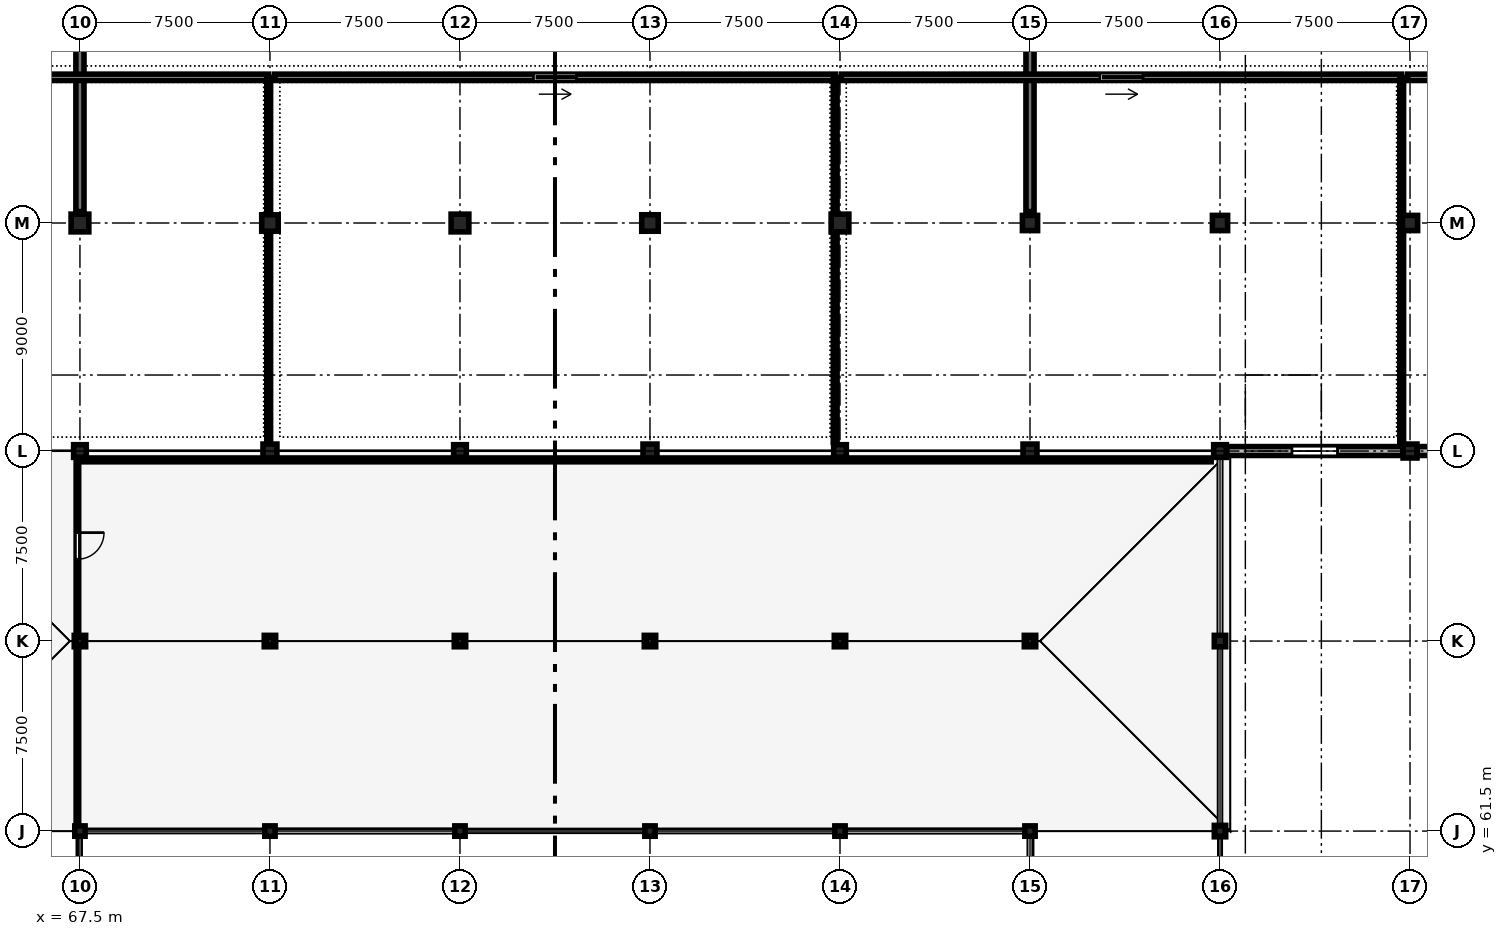
"""IFC4 building model, lengths in metres.
Left out: names, types, materials, properties, quantities, classifications, styles, units other than length and angle.
Written with IfcOpenShell. Run it as: python <this file> out.ifc"""

import sys

from ifc_helpers import new_model, si_unit, direction, frame, frame_2d, origin, origin_2d, place, context, subcontext, project, spatial, rectangle, circle, hollow_circle, i_section, extrude, element, fill, save


model = new_model("IFC4")
c1 = context("Model", 3, precision=1e-05, world=origin(), true_north=direction((0.0, 1.0)))
c2 = subcontext(c1, "Body", "Model", "MODEL_VIEW")
j1 = project(units=[si_unit("LENGTHUNIT", "METRE"), si_unit("PLANEANGLEUNIT", "RADIAN")], contexts=[c1])
p1 = place(None, origin())
s1 = spatial("IfcSite", under=j1, at=p1, CompositionType="ELEMENT")
p2 = place(p1, origin())
s2 = spatial("IfcBuilding", under=s1, at=p2, CompositionType="ELEMENT")
p3 = place(p2, frame((0.0, 0.0, 9.3)))
s3 = spatial("IfcBuildingStorey", under=s2, at=p3, CompositionType="ELEMENT", Elevation=9.3)
p4 = place(p3, frame((67.5, 61.5, 0.0), z_axis=(0.0, 0.0, 1.0), x_axis=(1.0, 0.0, 0.0)))
e1 = element("IfcColumn", 1, at=p4, inside=s3, PredefinedType="COLUMN", context=c2, shape_type="SweptSolid", body=[
    extrude(i_section(OverallWidth=0.3, OverallDepth=0.36, WebThickness=0.012, FlangeThickness=0.022, FilletRadius=0.027, at=origin_2d()), origin(), (0.0, 0.0, 1.0), 4.8),
])
p5 = place(p3, frame((67.5, 69.0, 0.0), z_axis=(0.0, 0.0, 1.0), x_axis=(1.0, 0.0, 0.0)))
e2 = element("IfcColumn", 2, at=p5, inside=s3, PredefinedType="COLUMN", context=c2, shape_type="SweptSolid", body=[
    extrude(rectangle(XDim=0.45, YDim=0.45, at=origin_2d()), origin(), (0.0, 0.0, 1.0), 4.8),
])
p6 = place(p3, frame((67.5, 76.5, 0.0), z_axis=(0.0, 0.0, 1.0), x_axis=(1.0, 0.0, 0.0)))
e3 = element("IfcColumn", 3, at=p6, inside=s3, PredefinedType="COLUMN", context=c2, shape_type="SweptSolid", body=[
    extrude(rectangle(XDim=0.5, YDim=0.5, at=origin_2d()), origin(), (0.0, 0.0, 1.0), 4.8),
])
p7 = place(p3, frame((67.5, 85.5, 0.0), z_axis=(0.0, 0.0, 1.0), x_axis=(1.0, 0.0, 0.0)))
e4 = element("IfcColumn", 4, at=p7, inside=s3, PredefinedType="COLUMN", context=c2, shape_type="SweptSolid", body=[
    extrude(rectangle(XDim=0.7, YDim=0.7, at=origin_2d()), origin(), (0.0, 0.0, 1.0), 4.8),
])
p8 = place(p3, frame((75.0, 61.5, 0.0), z_axis=(0.0, 0.0, 1.0), x_axis=(1.0, 0.0, 0.0)))
e5 = element("IfcColumn", 5, at=p8, inside=s3, PredefinedType="COLUMN", context=c2, shape_type="SweptSolid", body=[
    extrude(i_section(OverallWidth=0.3, OverallDepth=0.36, WebThickness=0.012, FlangeThickness=0.022, FilletRadius=0.027, at=origin_2d()), origin(), (0.0, 0.0, 1.0), 4.8),
])
p9 = place(p3, frame((75.0, 69.0, 0.0), z_axis=(0.0, 0.0, 1.0), x_axis=(1.0, 0.0, 0.0)))
e6 = element("IfcColumn", 6, at=p9, inside=s3, PredefinedType="COLUMN", context=c2, shape_type="SweptSolid", body=[
    extrude(rectangle(XDim=0.45, YDim=0.45, at=origin_2d()), origin(), (0.0, 0.0, 1.0), 4.8),
])
p10 = place(p3, frame((75.0, 76.5, 0.0), z_axis=(0.0, 0.0, 1.0), x_axis=(1.0, 0.0, 0.0)))
e7 = element("IfcColumn", 7, at=p10, inside=s3, PredefinedType="COLUMN", context=c2, shape_type="SweptSolid", body=[
    extrude(rectangle(XDim=0.55, YDim=0.55, at=origin_2d()), origin(), (0.0, 0.0, 1.0), 4.8),
])
p11 = place(p3, frame((75.0, 85.5, 0.0), z_axis=(0.0, 0.0, 1.0), x_axis=(1.0, 0.0, 0.0)))
e8 = element("IfcColumn", 8, at=p11, inside=s3, PredefinedType="COLUMN", context=c2, shape_type="SweptSolid", body=[
    extrude(rectangle(XDim=0.65, YDim=0.65, at=origin_2d()), origin(), (0.0, 0.0, 1.0), 4.8),
])
p12 = place(p3, frame((82.5, 61.5, 0.0), z_axis=(0.0, 0.0, 1.0), x_axis=(1.0, 0.0, 0.0)))
e9 = element("IfcColumn", 9, at=p12, inside=s3, PredefinedType="COLUMN", context=c2, shape_type="SweptSolid", body=[
    extrude(i_section(OverallWidth=0.3, OverallDepth=0.36, WebThickness=0.012, FlangeThickness=0.022, FilletRadius=0.027, at=origin_2d()), origin(), (0.0, 0.0, 1.0), 4.8),
])
p13 = place(p3, frame((82.5, 69.0, 0.0), z_axis=(0.0, 0.0, 1.0), x_axis=(1.0, 0.0, 0.0)))
e10 = element("IfcColumn", 10, at=p13, inside=s3, PredefinedType="COLUMN", context=c2, shape_type="SweptSolid", body=[
    extrude(rectangle(XDim=0.45, YDim=0.45, at=origin_2d()), origin(), (0.0, 0.0, 1.0), 4.8),
])
p14 = place(p3, frame((82.5, 76.5, 0.0), z_axis=(0.0, 0.0, 1.0), x_axis=(1.0, 0.0, 0.0)))
e11 = element("IfcColumn", 11, at=p14, inside=s3, PredefinedType="COLUMN", context=c2, shape_type="SweptSolid", body=[
    extrude(rectangle(XDim=0.5, YDim=0.5, at=origin_2d()), origin(), (0.0, 0.0, 1.0), 4.8),
])
p15 = place(p3, frame((82.5, 85.5, 0.0), z_axis=(0.0, 0.0, 1.0), x_axis=(1.0, 0.0, 0.0)))
e12 = element("IfcColumn", 12, at=p15, inside=s3, PredefinedType="COLUMN", context=c2, shape_type="SweptSolid", body=[
    extrude(rectangle(XDim=0.7, YDim=0.7, at=origin_2d()), origin(), (0.0, 0.0, 1.0), 4.8),
])
p16 = place(p3, frame((90.0, 61.5, 0.0), z_axis=(0.0, 0.0, 1.0), x_axis=(1.0, 0.0, 0.0)))
e13 = element("IfcColumn", 13, at=p16, inside=s3, PredefinedType="COLUMN", context=c2, shape_type="SweptSolid", body=[
    extrude(i_section(OverallWidth=0.3, OverallDepth=0.36, WebThickness=0.012, FlangeThickness=0.022, FilletRadius=0.027, at=origin_2d()), origin(), (0.0, 0.0, 1.0), 4.8),
])
p17 = place(p3, frame((90.0, 69.0, 0.0), z_axis=(0.0, 0.0, 1.0), x_axis=(1.0, 0.0, 0.0)))
e14 = element("IfcColumn", 14, at=p17, inside=s3, PredefinedType="COLUMN", context=c2, shape_type="SweptSolid", body=[
    extrude(rectangle(XDim=0.45, YDim=0.45, at=origin_2d()), origin(), (0.0, 0.0, 1.0), 4.8),
])
p18 = place(p3, frame((90.0, 76.5, 0.0), z_axis=(0.0, 0.0, 1.0), x_axis=(1.0, 0.0, 0.0)))
e15 = element("IfcColumn", 15, at=p18, inside=s3, PredefinedType="COLUMN", context=c2, shape_type="SweptSolid", body=[
    extrude(rectangle(XDim=0.55, YDim=0.55, at=origin_2d()), origin(), (0.0, 0.0, 1.0), 4.8),
])
p19 = place(p3, frame((90.0, 85.5, 0.0), z_axis=(0.0, 0.0, 1.0), x_axis=(1.0, 0.0, 0.0)))
e16 = element("IfcColumn", 16, at=p19, inside=s3, PredefinedType="COLUMN", context=c2, shape_type="SweptSolid", body=[
    extrude(rectangle(XDim=0.65, YDim=0.65, at=origin_2d()), origin(), (0.0, 0.0, 1.0), 4.8),
])
p20 = place(p3, frame((97.5, 61.5, 0.0), z_axis=(0.0, 0.0, 1.0), x_axis=(1.0, 0.0, 0.0)))
e17 = element("IfcColumn", 17, at=p20, inside=s3, PredefinedType="COLUMN", context=c2, shape_type="SweptSolid", body=[
    extrude(i_section(OverallWidth=0.3, OverallDepth=0.36, WebThickness=0.012, FlangeThickness=0.022, FilletRadius=0.027, at=origin_2d()), origin(), (0.0, 0.0, 1.0), 4.8),
])
p21 = place(p3, frame((97.5, 69.0, 0.0), z_axis=(0.0, 0.0, 1.0), x_axis=(1.0, 0.0, 0.0)))
e18 = element("IfcColumn", 18, at=p21, inside=s3, PredefinedType="COLUMN", context=c2, shape_type="SweptSolid", body=[
    extrude(rectangle(XDim=0.45, YDim=0.45, at=origin_2d()), origin(), (0.0, 0.0, 1.0), 4.8),
])
p22 = place(p3, frame((97.5, 76.5, 0.0), z_axis=(0.0, 0.0, 1.0), x_axis=(1.0, 0.0, 0.0)))
e19 = element("IfcColumn", 19, at=p22, inside=s3, PredefinedType="COLUMN", context=c2, shape_type="SweptSolid", body=[
    extrude(rectangle(XDim=0.5, YDim=0.5, at=origin_2d()), origin(), (0.0, 0.0, 1.0), 4.8),
])
p23 = place(p3, frame((97.5, 85.5, 0.0), z_axis=(0.0, 0.0, 1.0), x_axis=(1.0, 0.0, 0.0)))
e20 = element("IfcColumn", 20, at=p23, inside=s3, PredefinedType="COLUMN", context=c2, shape_type="SweptSolid", body=[
    extrude(rectangle(XDim=0.7, YDim=0.7, at=origin_2d()), origin(), (0.0, 0.0, 1.0), 4.8),
])
p24 = place(p3, frame((105.0, 61.5, 0.0), z_axis=(0.0, 0.0, 1.0), x_axis=(1.0, 0.0, 0.0)))
e21 = element("IfcColumn", 21, at=p24, inside=s3, PredefinedType="COLUMN", context=c2, shape_type="SweptSolid", body=[
    extrude(i_section(OverallWidth=0.3, OverallDepth=0.36, WebThickness=0.012, FlangeThickness=0.022, FilletRadius=0.027, at=origin_2d()), origin(), (0.0, 0.0, 1.0), 4.8),
])
p25 = place(p3, frame((105.0, 69.0, 0.0), z_axis=(0.0, 0.0, 1.0), x_axis=(1.0, 0.0, 0.0)))
e22 = element("IfcColumn", 22, at=p25, inside=s3, PredefinedType="COLUMN", context=c2, shape_type="SweptSolid", body=[
    extrude(rectangle(XDim=0.45, YDim=0.45, at=origin_2d()), origin(), (0.0, 0.0, 1.0), 4.8),
])
p26 = place(p3, frame((105.0, 76.5, 0.0), z_axis=(0.0, 0.0, 1.0), x_axis=(1.0, 0.0, 0.0)))
e23 = element("IfcColumn", 23, at=p26, inside=s3, PredefinedType="COLUMN", context=c2, shape_type="SweptSolid", body=[
    extrude(rectangle(XDim=0.55, YDim=0.55, at=origin_2d()), origin(), (0.0, 0.0, 1.0), 4.8),
])
p27 = place(p3, frame((105.0, 85.5, 0.0), z_axis=(0.0, 0.0, 1.0), x_axis=(1.0, 0.0, 0.0)))
e24 = element("IfcColumn", 24, at=p27, inside=s3, PredefinedType="COLUMN", context=c2, shape_type="SweptSolid", body=[
    extrude(rectangle(XDim=0.6, YDim=0.6, at=origin_2d()), origin(), (0.0, 0.0, 1.0), 4.8),
])
for number, where, z_axis, x_axis in (
    (25, (112.5, 61.5, 0.0), (0.0, 0.0, 1.0), (1.0, 0.0, 0.0)),
    (26, (112.5, 69.0, 0.0), (0.0, 0.0, 1.0), (1.0, 0.0, 0.0)),
):
    element("IfcColumn", number, at=place(p3, frame(where, z_axis=z_axis, x_axis=x_axis)), inside=s3, PredefinedType="COLUMN", context=c2, shape_type="SweptSolid", body=[
        extrude(rectangle(XDim=0.45, YDim=0.45, at=origin_2d()), origin(), (0.0, 0.0, 1.0), 4.8),
    ])
p28 = place(p3, frame((112.5, 76.5, 0.0), z_axis=(0.0, 0.0, 1.0), x_axis=(1.0, 0.0, 0.0)))
e27 = element("IfcColumn", 27, at=p28, inside=s3, PredefinedType="COLUMN", context=c2, shape_type="SweptSolid", body=[
    extrude(rectangle(XDim=0.5, YDim=0.5, at=origin_2d()), origin(), (0.0, 0.0, 1.0), 4.8),
])
p29 = place(p3, frame((112.5, 85.5, 0.0), z_axis=(0.0, 0.0, 1.0), x_axis=(1.0, 0.0, 0.0)))
e28 = element("IfcColumn", 28, at=p29, inside=s3, PredefinedType="COLUMN", context=c2, shape_type="SweptSolid", body=[
    extrude(rectangle(XDim=0.6, YDim=0.6, at=origin_2d()), origin(), (0.0, 0.0, 1.0), 4.8),
])
p30 = place(p3, frame((120.0, 76.5, 0.0), z_axis=(0.0, 0.0, 1.0), x_axis=(1.0, 0.0, 0.0)))
e29 = element("IfcColumn", 29, at=p30, inside=s3, PredefinedType="COLUMN", context=c2, shape_type="SweptSolid", body=[
    extrude(rectangle(XDim=0.55, YDim=0.55, at=origin_2d()), origin(), (0.0, 0.0, 1.0), 4.8),
])
p31 = place(p3, frame((120.0, 85.5, 0.0), z_axis=(0.0, 0.0, 1.0), x_axis=(1.0, 0.0, 0.0)))
e30 = element("IfcColumn", 30, at=p31, inside=s3, PredefinedType="COLUMN", context=c2, shape_type="SweptSolid", body=[
    extrude(circle(Radius=0.3, at=origin_2d()), origin(), (0.0, 0.0, 1.0), 4.8),
])
for number, where, z_axis, x_axis in (
    (31, (67.5, 85.95, 0.0), (0.0, 0.0, 1.0), (0.0, 1.0, 0.0)),
    (32, (105.0, 85.95, 0.0), (0.0, 0.0, 1.0), (0.0, 1.0, 0.0)),
):
    element("IfcWall", number, at=place(p3, frame(where, z_axis=z_axis, x_axis=x_axis)), inside=s3, PredefinedType="SHEAR", context=c2, shape_type="SweptSolid", body=[
        extrude(rectangle(XDim=6.6, YDim=0.32, at=frame_2d((3.3, 0.0))), origin(), (0.0, 0.0, 1.0), 4.0),
    ])
p32 = place(p3, frame((67.5, 61.5, 4.8), z_axis=(0.0, 0.0, 1.0), x_axis=(1.0, 0.0, 0.0)))
e33 = element("IfcColumn", 33, at=p32, inside=s3, PredefinedType="COLUMN", context=c2, shape_type="SweptSolid", body=[
    extrude(hollow_circle(Radius=0.203, WallThickness=0.016, at=origin_2d()), origin(), (0.0, 0.0, 1.0), 4.415),
])
p33 = place(p3, frame((75.0, 61.5, 4.8), z_axis=(0.0, 0.0, 1.0), x_axis=(1.0, 0.0, 0.0)))
e34 = element("IfcColumn", 34, at=p33, inside=s3, PredefinedType="COLUMN", context=c2, shape_type="SweptSolid", body=[
    extrude(hollow_circle(Radius=0.203, WallThickness=0.016, at=origin_2d()), origin(), (0.0, 0.0, 1.0), 5.525),
])
for number, where, z_axis, x_axis in (
    (35, (82.5, 61.5, 4.8), (0.0, 0.0, 1.0), (1.0, 0.0, 0.0)),
    (36, (90.0, 61.5, 4.8), (0.0, 0.0, 1.0), (1.0, 0.0, 0.0)),
):
    element("IfcColumn", number, at=place(p3, frame(where, z_axis=z_axis, x_axis=x_axis)), inside=s3, PredefinedType="COLUMN", context=c2, shape_type="SweptSolid", body=[
        extrude(hollow_circle(Radius=0.203, WallThickness=0.016, at=origin_2d()), origin(), (0.0, 0.0, 1.0), 6.081),
    ])
p34 = place(p3, frame((97.5, 61.5, 4.8), z_axis=(0.0, 0.0, 1.0), x_axis=(1.0, 0.0, 0.0)))
e37 = element("IfcColumn", 37, at=p34, inside=s3, PredefinedType="COLUMN", context=c2, shape_type="SweptSolid", body=[
    extrude(hollow_circle(Radius=0.203, WallThickness=0.016, at=origin_2d()), origin(), (0.0, 0.0, 1.0), 5.525),
])
p35 = place(p3, frame((105.0, 61.5, 4.8), z_axis=(0.0, 0.0, 1.0), x_axis=(1.0, 0.0, 0.0)))
e38 = element("IfcColumn", 38, at=p35, inside=s3, PredefinedType="COLUMN", context=c2, shape_type="SweptSolid", body=[
    extrude(hollow_circle(Radius=0.203, WallThickness=0.016, at=origin_2d()), origin(), (0.0, 0.0, 1.0), 4.415),
])
p36 = place(p3, frame((112.5, 61.5, 4.8), z_axis=(0.0, 0.0, 1.0), x_axis=(1.0, 0.0, 0.0)))
e39 = element("IfcColumn", 39, at=p36, inside=s3, PredefinedType="COLUMN", context=c2, shape_type="SweptSolid", body=[
    extrude(hollow_circle(Radius=0.203, WallThickness=0.016, at=origin_2d()), origin(), (0.0, 0.0, 1.0), 2.75),
])
for number, where, z_axis, x_axis in (
    (40, (67.5, 69.0, 4.8), (0.0, 0.0, 1.0), (1.0, 0.0, 0.0)),
    (41, (75.0, 69.0, 4.8), (0.0, 0.0, 1.0), (1.0, 0.0, 0.0)),
    (42, (82.5, 69.0, 4.8), (0.0, 0.0, 1.0), (1.0, 0.0, 0.0)),
    (43, (90.0, 69.0, 4.8), (0.0, 0.0, 1.0), (1.0, 0.0, 0.0)),
    (44, (97.5, 69.0, 4.8), (0.0, 0.0, 1.0), (1.0, 0.0, 0.0)),
    (45, (105.0, 69.0, 4.8), (0.0, 0.0, 1.0), (1.0, 0.0, 0.0)),
):
    element("IfcColumn", number, at=place(p3, frame(where, z_axis=z_axis, x_axis=x_axis)), inside=s3, PredefinedType="COLUMN", context=c2, shape_type="SweptSolid", body=[
        extrude(i_section(OverallWidth=0.3, OverallDepth=0.3, WebThickness=0.011, FlangeThickness=0.019, FilletRadius=0.027, at=origin_2d()), origin(), (0.0, 0.0, 1.0), 1.872),
    ])
p37 = place(p3, frame((119.715, 76.5, 0.0), z_axis=(0.0, 0.0, 1.0), x_axis=(-1.0, 0.0, 0.0)))
e46 = element("IfcWall", 46, at=p37, inside=s3, PredefinedType="STANDARD", context=c2, shape_type="SweptSolid", body=[
    extrude(rectangle(XDim=6.955, YDim=0.35, at=frame_2d((3.478, 0.0))), origin(), (0.0, 0.0, 1.0), 3.95),
])
p38 = place(p37, frame((2.577, 0.0, 0.9)))
e47 = element("IfcOpeningElement", 47, at=p38, cuts=e46, PredefinedType="OPENING", context=c2, shape_type="SweptSolid", body=[
    extrude(rectangle(XDim=1.8, YDim=1.8, at=frame_2d((0.9, 0.9))), frame((0.0, 0.185, 0.0), z_axis=(0.0, -1.0, 0.0), x_axis=(1.0, 0.0, 0.0)), (0.0, 0.0, 1.0), 0.37),
])
p39 = place(p3, frame((127.24, 76.5, 0.0), z_axis=(0.0, 0.0, 1.0), x_axis=(-1.0, 0.0, 0.0)))
e48 = element("IfcWall", 48, at=p39, inside=s3, PredefinedType="STANDARD", context=c2, shape_type="SweptSolid", body=[
    extrude(rectangle(XDim=6.955, YDim=0.35, at=frame_2d((3.478, 0.0))), origin(), (0.0, 0.0, 1.0), 3.95),
])
p40 = place(p39, frame((2.577, 0.0, 0.9)))
e49 = element("IfcOpeningElement", 49, at=p40, cuts=e48, PredefinedType="OPENING", context=c2, shape_type="SweptSolid", body=[
    extrude(rectangle(XDim=1.8, YDim=2.4, at=frame_2d((0.9, 1.2))), frame((0.0, 0.185, 0.0), z_axis=(0.0, -1.0, 0.0), x_axis=(1.0, 0.0, 0.0)), (0.0, 0.0, 1.0), 0.37),
])
p41 = place(p3, frame((67.4, 76.15, 0.0), z_axis=(0.0, 0.0, 1.0), x_axis=(0.0, -1.0, 0.0)))
e50 = element("IfcWall", 50, at=p41, inside=s3, PredefinedType="PARTITIONING", context=c2, shape_type="SweptSolid", body=[
    extrude(rectangle(XDim=14.65, YDim=0.1, at=frame_2d((7.325, 0.0))), origin(), (0.0, 0.0, 1.0), 4.535),
])
p42 = place(p41, frame((2.87, 0.0, 0.0)))
e51 = element("IfcOpeningElement", 51, at=p42, cuts=e50, PredefinedType="OPENING", context=c2, shape_type="SweptSolid", body=[
    extrude(rectangle(XDim=1.05, YDim=2.2, at=frame_2d((0.525, 1.1))), frame((0.0, 0.06, 0.0), z_axis=(0.0, -1.0, 0.0), x_axis=(1.0, 0.0, 0.0)), (0.0, 0.0, 1.0), 0.12),
])
p43 = place(p3, frame((74.95, 91.25, 0.0), z_axis=(0.0, 0.0, 1.0), x_axis=(-1.0, 0.0, 0.0)))
e52 = element("IfcWall", 52, at=p43, inside=s3, PredefinedType="STANDARD", context=c2, shape_type="SweptSolid", body=[
    extrude(rectangle(XDim=22.12, YDim=0.25, at=frame_2d((11.06, 0.0))), origin(), (0.0, 0.0, 1.0), 4.535),
])
p44 = place(p43, frame((10.21, 0.0, 0.0)))
e53 = element("IfcOpeningElement", 53, at=p44, cuts=e52, PredefinedType="OPENING", context=c2, shape_type="SweptSolid", body=[
    extrude(rectangle(XDim=1.7, YDim=2.4, at=frame_2d((0.85, 1.2))), frame((0.0, 0.135, 0.0), z_axis=(0.0, -1.0, 0.0), x_axis=(1.0, 0.0, 0.0)), (0.0, 0.0, 1.0), 0.27),
])
p45 = place(p3, frame((97.31, 91.25, 0.0), z_axis=(0.0, 0.0, 1.0), x_axis=(-1.0, 0.0, 0.0)))
e54 = element("IfcWall", 54, at=p45, inside=s3, PredefinedType="STANDARD", context=c2, shape_type="SweptSolid", body=[
    extrude(rectangle(XDim=22.12, YDim=0.25, at=frame_2d((11.06, 0.0))), origin(), (0.0, 0.0, 1.0), 4.535),
])
p46 = place(p45, frame((10.21, 0.0, 0.0)))
e55 = element("IfcOpeningElement", 55, at=p46, cuts=e54, PredefinedType="OPENING", context=c2, shape_type="SweptSolid", body=[
    extrude(rectangle(XDim=1.7, YDim=2.4, at=frame_2d((0.85, 1.2))), frame((0.0, 0.135, 0.0), z_axis=(0.0, -1.0, 0.0), x_axis=(1.0, 0.0, 0.0)), (0.0, 0.0, 1.0), 0.27),
])
p47 = place(p3, frame((119.67, 91.25, 0.0), z_axis=(0.0, 0.0, 1.0), x_axis=(-1.0, 0.0, 0.0)))
e56 = element("IfcWall", 56, at=p47, inside=s3, PredefinedType="STANDARD", context=c2, shape_type="SweptSolid", body=[
    extrude(rectangle(XDim=22.12, YDim=0.25, at=frame_2d((11.06, 0.0))), origin(), (0.0, 0.0, 1.0), 4.535),
])
p48 = place(p47, frame((10.21, 0.0, 0.0)))
e57 = element("IfcOpeningElement", 57, at=p48, cuts=e56, PredefinedType="OPENING", context=c2, shape_type="SweptSolid", body=[
    extrude(rectangle(XDim=1.7, YDim=2.4, at=frame_2d((0.85, 1.2))), frame((0.0, 0.135, 0.0), z_axis=(0.0, -1.0, 0.0), x_axis=(1.0, 0.0, 0.0)), (0.0, 0.0, 1.0), 0.27),
])
p49 = place(p3, frame((142.03, 91.25, 0.0), z_axis=(0.0, 0.0, 1.0), x_axis=(-1.0, 0.0, 0.0)))
e58 = element("IfcWall", 58, at=p49, inside=s3, PredefinedType="STANDARD", context=c2, shape_type="SweptSolid", body=[
    extrude(rectangle(XDim=22.12, YDim=0.25, at=frame_2d((11.06, 0.0))), origin(), (0.0, 0.0, 1.0), 4.535),
])
p50 = place(p49, frame((2.242, 0.0, 0.0)))
e59 = element("IfcOpeningElement", 59, at=p50, cuts=e58, PredefinedType="OPENING", context=c2, shape_type="SweptSolid", body=[
    extrude(rectangle(XDim=1.7, YDim=2.4, at=frame_2d((0.85, 1.2))), frame((0.0, 0.135, 0.0), z_axis=(0.0, -1.0, 0.0), x_axis=(1.0, 0.0, 0.0)), (0.0, 0.0, 1.0), 0.27),
])
p51 = place(p3, frame((67.4, 76.15, 0.0), z_axis=(0.0, 0.0, 1.0), x_axis=(1.0, 0.0, 0.0)))
e60 = element("IfcWall", 60, at=p51, inside=s3, PredefinedType="PARTITIONING", context=c2, shape_type="SweptSolid", body=[
    extrude(rectangle(XDim=44.75, YDim=0.15, at=frame_2d((22.375, 0.0))), origin(), (0.0, 0.0, 1.0), 3.935),
])
for number, where, z_axis, x_axis in (
    (61, (74.95, 76.85, 0.0), (0.0, 0.0, 1.0), (0.0, 1.0, 0.0)),
    (62, (97.31, 76.85, 0.0), (0.0, 0.0, 1.0), (0.0, 1.0, 0.0)),
    (63, (119.67, 76.85, 0.0), (0.0, 0.0, 1.0), (0.0, 1.0, 0.0)),
):
    element("IfcWall", number, at=place(p3, frame(where, z_axis=z_axis, x_axis=x_axis)), inside=s3, PredefinedType="PARTITIONING", context=c2, shape_type="SweptSolid", body=[
        extrude(rectangle(XDim=14.4, YDim=0.15, at=frame_2d((7.2, 0.0))), origin(), (0.0, 0.0, 1.0), 3.835),
    ])
p52 = place(p38, origin())
e64 = element("IfcWindow", 64, at=p52, inside=s3, PartitioningType="SINGLE_PANEL", PredefinedType="WINDOW", context=c2, shape_type="SweptSolid", body=[
    extrude(rectangle(XDim=1.8, YDim=1.8, at=frame_2d((0.9, 0.9))), frame((0.0, 0.03, 0.0), z_axis=(0.0, -1.0, 0.0), x_axis=(1.0, 0.0, 0.0)), (0.0, 0.0, 1.0), 0.06),
])
fill(e47, e64)
p53 = place(p42, origin())
e65 = element("IfcDoor", 65, at=p53, inside=s3, OperationType="SINGLE_SWING_LEFT", PredefinedType="DOOR", context=c2, shape_type="SweptSolid", body=[
    extrude(rectangle(XDim=1.05, YDim=2.2, at=frame_2d((0.525, 1.1))), frame((0.0, 0.025, 0.0), z_axis=(0.0, -1.0, 0.0), x_axis=(1.0, 0.0, 0.0)), (0.0, 0.0, 1.0), 0.05),
])
fill(e51, e65)
p54 = place(p46, origin())
e66 = element("IfcDoor", 66, at=p54, inside=s3, OperationType="DOUBLE_DOOR_SLIDING", PredefinedType="DOOR", context=c2, shape_type="SweptSolid", body=[
    extrude(rectangle(XDim=1.7, YDim=2.4, at=frame_2d((0.85, 1.2))), frame((0.0, 0.025, 0.0), z_axis=(0.0, -1.0, 0.0), x_axis=(1.0, 0.0, 0.0)), (0.0, 0.0, 1.0), 0.05),
])
fill(e55, e66)
p55 = place(p48, origin())
e67 = element("IfcDoor", 67, at=p55, inside=s3, OperationType="DOUBLE_DOOR_SLIDING", PredefinedType="DOOR", context=c2, shape_type="SweptSolid", body=[
    extrude(rectangle(XDim=1.7, YDim=2.4, at=frame_2d((0.85, 1.2))), frame((0.0, 0.025, 0.0), z_axis=(0.0, -1.0, 0.0), x_axis=(1.0, 0.0, 0.0)), (0.0, 0.0, 1.0), 0.05),
])
fill(e57, e67)
save(model, sys.argv[1])
